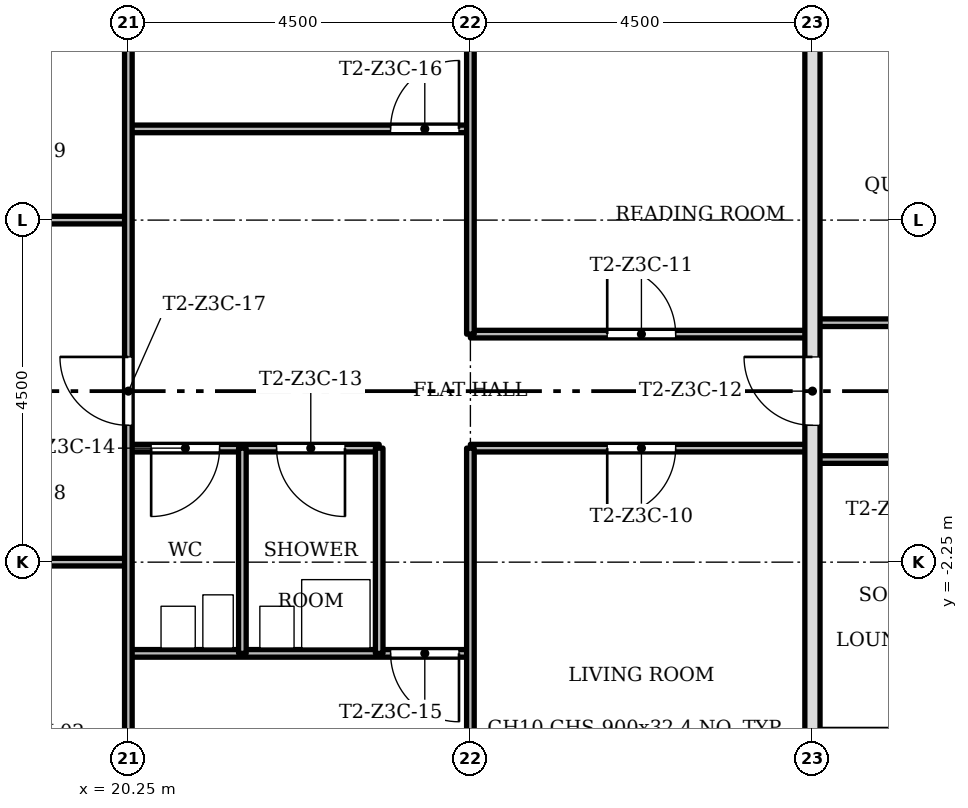
"""IFC4 building model, lengths in metres.
Left out: names, types, materials, properties, quantities, classifications, styles, units other than length and angle.
Written with IfcOpenShell. Run it as: python <this file> out.ifc"""

import sys

from ifc_helpers import new_model, si_unit, direction, frame, frame_2d, origin, place, context, subcontext, project, spatial, rectangle, extrude, element, fill, save


model = new_model("IFC4")
c1 = context("Model", 3, precision=1e-05, world=origin(), true_north=direction((0.0, 1.0)))
c2 = subcontext(c1, "Body", "Model", "MODEL_VIEW")
j1 = project(units=[si_unit("LENGTHUNIT", "METRE"), si_unit("PLANEANGLEUNIT", "RADIAN")], contexts=[c1])
p1 = place(None, origin())
s1 = spatial("IfcSite", under=j1, at=p1, CompositionType="ELEMENT")
p2 = place(p1, origin())
s2 = spatial("IfcBuilding", under=s1, at=p2, CompositionType="ELEMENT")
p3 = place(p2, frame((0.0, 0.0, 160.9)))
s3 = spatial("IfcBuildingStorey", under=s2, at=p3, CompositionType="ELEMENT", Elevation=160.9)
p4 = place(p3, frame((24.75, -3.45, 0.0), z_axis=(0.0, 0.0, 1.0), x_axis=(-1.0, 0.0, 0.0)))
e1 = element("IfcWall", 1, at=p4, inside=s3, PredefinedType="PARTITIONING", context=c2, shape_type="SweptSolid", body=[
    extrude(rectangle(XDim=4.5, YDim=0.1, at=frame_2d((2.25, 0.0))), origin(), (0.0, 0.0, 1.0), 3.0),
])
p5 = place(p4, frame((0.15, 0.0, 0.0)))
e2 = element("IfcOpeningElement", 2, at=p5, cuts=e1, PredefinedType="OPENING", context=c2, shape_type="SweptSolid", body=[
    extrude(rectangle(XDim=0.9, YDim=2.1, at=frame_2d((0.45, 1.05))), frame((0.0, 0.06, 0.0), z_axis=(0.0, -1.0, 0.0), x_axis=(1.0, 0.0, 0.0)), (0.0, 0.0, 1.0), 0.12),
])
p6 = place(p3, frame((20.25, -2.25, 0.0), z_axis=(0.0, 0.0, 1.0), x_axis=(-1.0, 0.0, 0.0)))
e3 = element("IfcWall", 3, at=p6, inside=s3, PredefinedType="PARTITIONING", context=c2, shape_type="SweptSolid", body=[
    extrude(rectangle(XDim=4.6, YDim=0.1, at=frame_2d((2.3, 0.0))), origin(), (0.0, 0.0, 1.0), 3.0),
])
p7 = place(p6, frame((1.05, 0.0, 0.0)))
e4 = element("IfcOpeningElement", 4, at=p7, cuts=e3, PredefinedType="OPENING", context=c2, shape_type="SweptSolid", body=[
    extrude(rectangle(XDim=0.9, YDim=2.1, at=frame_2d((0.45, 1.05))), frame((0.0, 0.06, 0.0), z_axis=(0.0, -1.0, 0.0), x_axis=(1.0, 0.0, 0.0)), (0.0, 0.0, 1.0), 0.12),
])
p8 = place(p3, frame((31.5, -0.9, 0.0), z_axis=(0.0, 0.0, 1.0), x_axis=(-1.0, 0.0, 0.0)))
e5 = element("IfcWall", 5, at=p8, inside=s3, PredefinedType="PARTITIONING", context=c2, shape_type="SweptSolid", body=[
    extrude(rectangle(XDim=2.25, YDim=0.1, at=frame_2d((1.125, 0.0))), origin(), (0.0, 0.0, 1.0), 3.0),
])
p9 = place(p3, frame((29.25, -0.75, 0.0), z_axis=(0.0, 0.0, 1.0), x_axis=(-1.0, 0.0, 0.0)))
e6 = element("IfcWall", 6, at=p9, inside=s3, PredefinedType="PARTITIONING", context=c2, shape_type="SweptSolid", body=[
    extrude(rectangle(XDim=4.5, YDim=0.1, at=frame_2d((2.25, 0.0))), origin(), (0.0, 0.0, 1.0), 3.0),
])
p10 = place(p9, frame((1.8, 0.0, 0.0)))
e7 = element("IfcOpeningElement", 7, at=p10, cuts=e6, PredefinedType="OPENING", context=c2, shape_type="SweptSolid", body=[
    extrude(rectangle(XDim=0.9, YDim=2.1, at=frame_2d((0.45, 1.05))), frame((0.0, 0.06, 0.0), z_axis=(0.0, -1.0, 0.0), x_axis=(1.0, 0.0, 0.0)), (0.0, 0.0, 1.0), 0.12),
])
p11 = place(p3, frame((23.55, -0.75, 0.0), z_axis=(0.0, 0.0, 1.0), x_axis=(-1.0, 0.0, 0.0)))
e8 = element("IfcWall", 8, at=p11, inside=s3, PredefinedType="PARTITIONING", context=c2, shape_type="SweptSolid", body=[
    extrude(rectangle(XDim=3.3, YDim=0.1, at=frame_2d((1.65, 0.0))), origin(), (0.0, 0.0, 1.0), 3.0),
])
p12 = place(p11, frame((0.45, 0.0, 0.0)))
e9 = element("IfcOpeningElement", 9, at=p12, cuts=e8, PredefinedType="OPENING", context=c2, shape_type="SweptSolid", body=[
    extrude(rectangle(XDim=0.9, YDim=2.1, at=frame_2d((0.45, 1.05))), frame((0.0, 0.06, 0.0), z_axis=(0.0, -1.0, 0.0), x_axis=(1.0, 0.0, 0.0)), (0.0, 0.0, 1.0), 0.12),
])
p13 = place(p11, frame((2.1, 0.0, 0.0)))
e10 = element("IfcOpeningElement", 10, at=p13, cuts=e8, PredefinedType="OPENING", context=c2, shape_type="SweptSolid", body=[
    extrude(rectangle(XDim=0.9, YDim=2.1, at=frame_2d((0.45, 1.05))), frame((0.0, 0.06, 0.0), z_axis=(0.0, -1.0, 0.0), x_axis=(1.0, 0.0, 0.0)), (0.0, 0.0, 1.0), 0.12),
])
p14 = place(p3, frame((29.25, 0.75, 0.0), z_axis=(0.0, 0.0, 1.0), x_axis=(-1.0, 0.0, 0.0)))
e11 = element("IfcWall", 11, at=p14, inside=s3, PredefinedType="PARTITIONING", context=c2, shape_type="SweptSolid", body=[
    extrude(rectangle(XDim=4.5, YDim=0.1, at=frame_2d((2.25, 0.0))), origin(), (0.0, 0.0, 1.0), 3.0),
])
p15 = place(p14, frame((1.8, 0.0, 0.0)))
e12 = element("IfcOpeningElement", 12, at=p15, cuts=e11, PredefinedType="OPENING", context=c2, shape_type="SweptSolid", body=[
    extrude(rectangle(XDim=0.9, YDim=2.1, at=frame_2d((0.45, 1.05))), frame((0.0, 0.06, 0.0), z_axis=(0.0, -1.0, 0.0), x_axis=(1.0, 0.0, 0.0)), (0.0, 0.0, 1.0), 0.12),
])
p16 = place(p3, frame((31.5, 0.9, 0.0), z_axis=(0.0, 0.0, 1.0), x_axis=(-1.0, 0.0, 0.0)))
e13 = element("IfcWall", 13, at=p16, inside=s3, PredefinedType="PARTITIONING", context=c2, shape_type="SweptSolid", body=[
    extrude(rectangle(XDim=2.25, YDim=0.1, at=frame_2d((1.125, 0.0))), origin(), (0.0, 0.0, 1.0), 3.0),
])
p17 = place(p3, frame((20.25, 2.25, 0.0), z_axis=(0.0, 0.0, 1.0), x_axis=(-1.0, 0.0, 0.0)))
e14 = element("IfcWall", 14, at=p17, inside=s3, PredefinedType="PARTITIONING", context=c2, shape_type="SweptSolid", body=[
    extrude(rectangle(XDim=4.6, YDim=0.1, at=frame_2d((2.3, 0.0))), origin(), (0.0, 0.0, 1.0), 3.0),
])
p18 = place(p17, frame((1.05, 0.0, 0.0)))
e15 = element("IfcOpeningElement", 15, at=p18, cuts=e14, PredefinedType="OPENING", context=c2, shape_type="SweptSolid", body=[
    extrude(rectangle(XDim=0.9, YDim=2.1, at=frame_2d((0.45, 1.05))), frame((0.0, 0.06, 0.0), z_axis=(0.0, -1.0, 0.0), x_axis=(1.0, 0.0, 0.0)), (0.0, 0.0, 1.0), 0.12),
])
p19 = place(p3, frame((24.75, 3.45, 0.0), z_axis=(0.0, 0.0, 1.0), x_axis=(-1.0, 0.0, 0.0)))
e16 = element("IfcWall", 16, at=p19, inside=s3, PredefinedType="PARTITIONING", context=c2, shape_type="SweptSolid", body=[
    extrude(rectangle(XDim=4.5, YDim=0.1, at=frame_2d((2.25, 0.0))), origin(), (0.0, 0.0, 1.0), 3.0),
])
p20 = place(p19, frame((0.15, 0.0, 0.0)))
e17 = element("IfcOpeningElement", 17, at=p20, cuts=e16, PredefinedType="OPENING", context=c2, shape_type="SweptSolid", body=[
    extrude(rectangle(XDim=0.9, YDim=2.1, at=frame_2d((0.45, 1.05))), frame((0.0, 0.06, 0.0), z_axis=(0.0, -1.0, 0.0), x_axis=(1.0, 0.0, 0.0)), (0.0, 0.0, 1.0), 0.12),
])
p21 = place(p3, frame((29.25, -6.85, 0.0), z_axis=(0.0, 0.0, 1.0), x_axis=(0.0, 1.0, 0.0)))
e18 = element("IfcWall", 18, at=p21, inside=s3, PredefinedType="SOLIDWALL", context=c2, shape_type="SweptSolid", body=[
    extrude(rectangle(XDim=13.7, YDim=0.2, at=frame_2d((6.85, 0.0))), origin(), (0.0, 0.0, 1.0), 3.0),
])
p22 = place(p21, frame((6.4, 0.0, 0.0)))
e19 = element("IfcOpeningElement", 19, at=p22, cuts=e18, PredefinedType="OPENING", context=c2, shape_type="SweptSolid", body=[
    extrude(rectangle(XDim=0.9, YDim=2.1, at=frame_2d((0.45, 1.05))), frame((0.0, 0.11, 0.0), z_axis=(0.0, -1.0, 0.0), x_axis=(1.0, 0.0, 0.0)), (0.0, 0.0, 1.0), 0.22),
])
for number, where, z_axis, x_axis in (
    (20, (24.75, -6.85, 0.0), (0.0, 0.0, 1.0), (0.0, 1.0, 0.0)),
    (21, (24.75, 0.75, 0.0), (0.0, 0.0, 1.0), (0.0, 1.0, 0.0)),
):
    element("IfcWall", number, at=place(p3, frame(where, z_axis=z_axis, x_axis=x_axis)), inside=s3, PredefinedType="PARTITIONING", context=c2, shape_type="SweptSolid", body=[
        extrude(rectangle(XDim=6.1, YDim=0.1, at=frame_2d((3.05, 0.0))), origin(), (0.0, 0.0, 1.0), 3.0),
    ])
for number, where, z_axis, x_axis in (
    (22, (23.55, -3.45, 0.0), (0.0, 0.0, 1.0), (0.0, 1.0, 0.0)),
    (23, (21.75, -3.45, 0.0), (0.0, 0.0, 1.0), (0.0, 1.0, 0.0)),
):
    element("IfcWall", number, at=place(p3, frame(where, z_axis=z_axis, x_axis=x_axis)), inside=s3, PredefinedType="PARTITIONING", context=c2, shape_type="SweptSolid", body=[
        extrude(rectangle(XDim=2.7, YDim=0.1, at=frame_2d((1.35, 0.0))), origin(), (0.0, 0.0, 1.0), 3.0),
    ])
p23 = place(p3, frame((20.25, -5.75, 0.0), z_axis=(0.0, 0.0, 1.0), x_axis=(0.0, 1.0, 0.0)))
e24 = element("IfcWall", 24, at=p23, inside=s3, PredefinedType="PARTITIONING", context=c2, shape_type="SweptSolid", body=[
    extrude(rectangle(XDim=11.5, YDim=0.1, at=frame_2d((5.75, 0.0))), origin(), (0.0, 0.0, 1.0), 3.0),
])
p24 = place(p23, frame((5.3, 0.0, 0.0)))
e25 = element("IfcOpeningElement", 25, at=p24, cuts=e24, PredefinedType="OPENING", context=c2, shape_type="SweptSolid", body=[
    extrude(rectangle(XDim=0.9, YDim=2.1, at=frame_2d((0.45, 1.05))), frame((0.0, 0.06, 0.0), z_axis=(0.0, -1.0, 0.0), x_axis=(1.0, 0.0, 0.0)), (0.0, 0.0, 1.0), 0.12),
])
p25 = place(p10, origin())
e26 = element("IfcDoor", 26, at=p25, inside=s3, OperationType="SINGLE_SWING_LEFT", PredefinedType="DOOR", context=c2, shape_type="SweptSolid", body=[
    extrude(rectangle(XDim=0.9, YDim=2.1, at=frame_2d((0.45, 1.05))), frame((0.0, 0.025, 0.0), z_axis=(0.0, -1.0, 0.0), x_axis=(1.0, 0.0, 0.0)), (0.0, 0.0, 1.0), 0.05),
])
fill(e7, e26)
p26 = place(p15, origin())
e27 = element("IfcDoor", 27, at=p26, inside=s3, OperationType="SINGLE_SWING_RIGHT", PredefinedType="DOOR", context=c2, shape_type="SweptSolid", body=[
    extrude(rectangle(XDim=0.9, YDim=2.1, at=frame_2d((0.45, 1.05))), frame((0.0, 0.025, 0.0), z_axis=(0.0, -1.0, 0.0), x_axis=(1.0, 0.0, 0.0)), (0.0, 0.0, 1.0), 0.05),
])
fill(e12, e27)
p27 = place(p22, origin())
e28 = element("IfcDoor", 28, at=p27, inside=s3, OperationType="SINGLE_SWING_LEFT", PredefinedType="DOOR", context=c2, shape_type="SweptSolid", body=[
    extrude(rectangle(XDim=0.9, YDim=2.1, at=frame_2d((0.45, 1.05))), frame((0.0, 0.025, 0.0), z_axis=(0.0, -1.0, 0.0), x_axis=(1.0, 0.0, 0.0)), (0.0, 0.0, 1.0), 0.05),
])
fill(e19, e28)
p28 = place(p12, origin())
e29 = element("IfcDoor", 29, at=p28, inside=s3, OperationType="SINGLE_SWING_RIGHT", PredefinedType="DOOR", context=c2, shape_type="SweptSolid", body=[
    extrude(rectangle(XDim=0.9, YDim=2.1, at=frame_2d((0.45, 1.05))), frame((0.0, 0.025, 0.0), z_axis=(0.0, -1.0, 0.0), x_axis=(1.0, 0.0, 0.0)), (0.0, 0.0, 1.0), 0.05),
])
fill(e9, e29)
p29 = place(p13, origin())
e30 = element("IfcDoor", 30, at=p29, inside=s3, OperationType="SINGLE_SWING_LEFT", PredefinedType="DOOR", context=c2, shape_type="SweptSolid", body=[
    extrude(rectangle(XDim=0.9, YDim=2.1, at=frame_2d((0.45, 1.05))), frame((0.0, 0.025, 0.0), z_axis=(0.0, -1.0, 0.0), x_axis=(1.0, 0.0, 0.0)), (0.0, 0.0, 1.0), 0.05),
])
fill(e10, e30)
p30 = place(p5, origin())
e31 = element("IfcDoor", 31, at=p30, inside=s3, OperationType="SINGLE_SWING_RIGHT", PredefinedType="DOOR", context=c2, shape_type="SweptSolid", body=[
    extrude(rectangle(XDim=0.9, YDim=2.1, at=frame_2d((0.45, 1.05))), frame((0.0, 0.025, 0.0), z_axis=(0.0, -1.0, 0.0), x_axis=(1.0, 0.0, 0.0)), (0.0, 0.0, 1.0), 0.05),
])
fill(e2, e31)
p31 = place(p20, origin())
e32 = element("IfcDoor", 32, at=p31, inside=s3, OperationType="SINGLE_SWING_LEFT", PredefinedType="DOOR", context=c2, shape_type="SweptSolid", body=[
    extrude(rectangle(XDim=0.9, YDim=2.1, at=frame_2d((0.45, 1.05))), frame((0.0, 0.025, 0.0), z_axis=(0.0, -1.0, 0.0), x_axis=(1.0, 0.0, 0.0)), (0.0, 0.0, 1.0), 0.05),
])
fill(e17, e32)
p32 = place(p24, origin())
e33 = element("IfcDoor", 33, at=p32, inside=s3, OperationType="SINGLE_SWING_LEFT", PredefinedType="DOOR", context=c2, shape_type="SweptSolid", body=[
    extrude(rectangle(XDim=0.9, YDim=2.1, at=frame_2d((0.45, 1.05))), frame((0.0, 0.025, 0.0), z_axis=(0.0, -1.0, 0.0), x_axis=(1.0, 0.0, 0.0)), (0.0, 0.0, 1.0), 0.05),
])
fill(e25, e33)
save(model, sys.argv[1])
